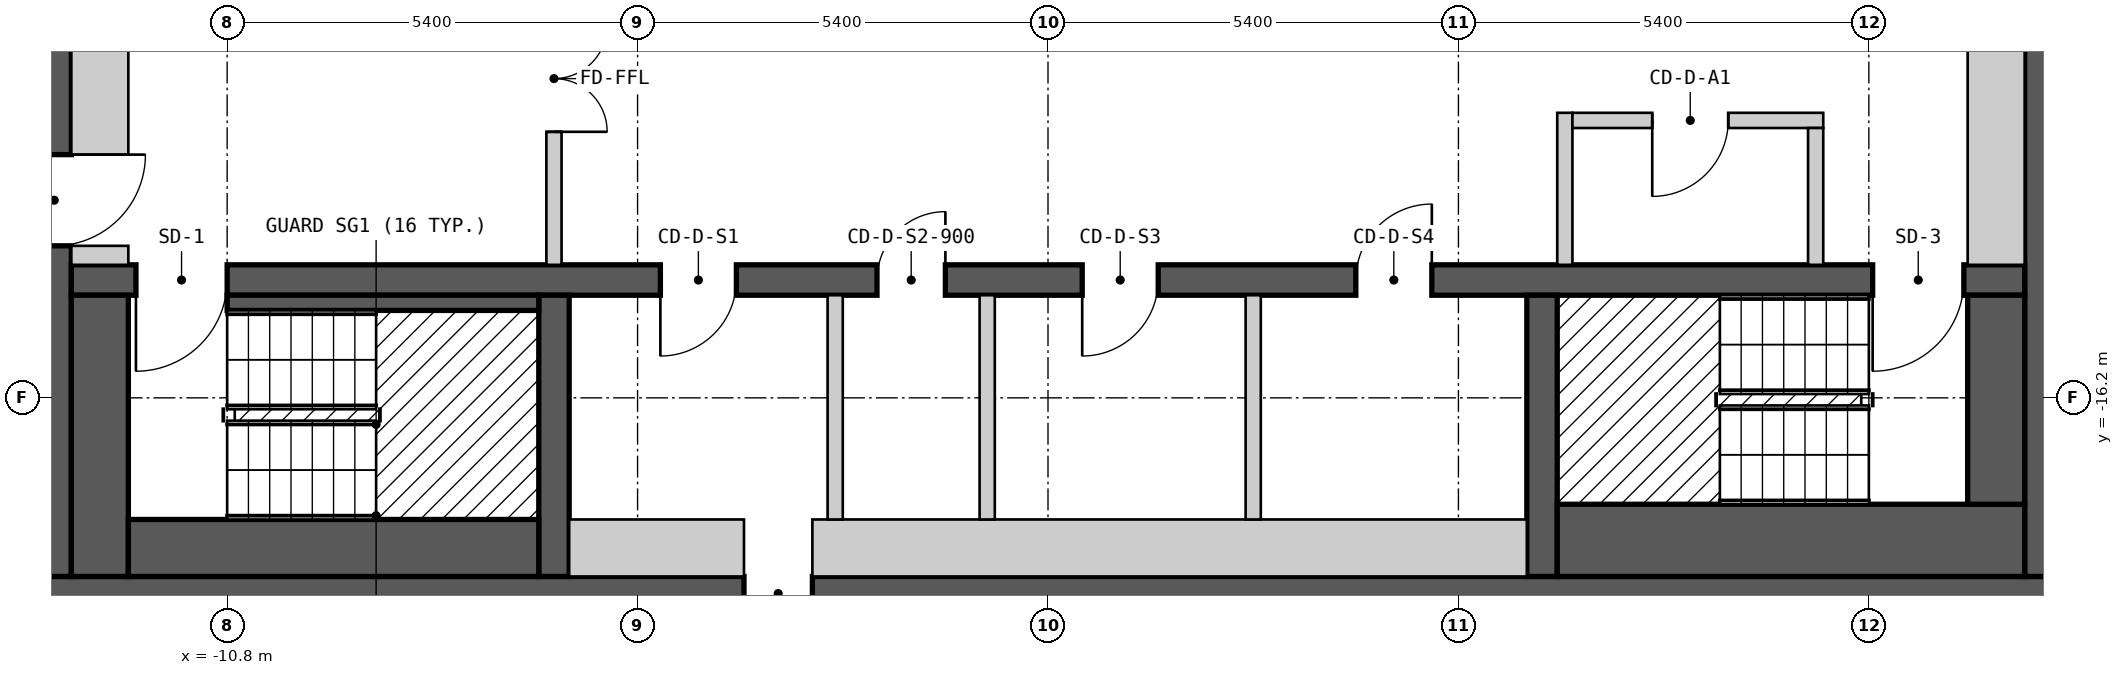
"""IFC4 building model, lengths in metres.
Left out: names, types, materials, properties, quantities, classifications, styles, units other than length and angle.
Written with IfcOpenShell. Run it as: python <this file> out.ifc"""

import sys

from ifc_helpers import new_model, si_unit, direction, frame, frame_2d, origin, place, context, subcontext, project, spatial, polyline, rectangle, outline, extrude, element, fill, save


model = new_model("IFC4")
c1 = context("Model", 3, precision=1e-05, world=origin(), true_north=direction((0.0, 1.0)))
c2 = subcontext(c1, "Body", "Model", "MODEL_VIEW")
j1 = project(units=[si_unit("LENGTHUNIT", "METRE"), si_unit("PLANEANGLEUNIT", "RADIAN")], contexts=[c1])
p1 = place(None, origin())
s1 = spatial("IfcSite", under=j1, at=p1, CompositionType="ELEMENT")
p2 = place(p1, origin())
s2 = spatial("IfcBuilding", under=s1, at=p2, CompositionType="ELEMENT")
p3 = place(p2, frame((0.0, 0.0, 217.8)))
s3 = spatial("IfcBuildingStorey", under=s2, at=p3, CompositionType="ELEMENT", Elevation=217.8)
p4 = place(p3, frame((-13.3, -18.775, 0.0), z_axis=(0.0, 0.0, 1.0), x_axis=(1.0, 0.0, 0.0)))
e1 = element("IfcWall", 1, at=p4, inside=s3, PredefinedType="SHEAR", context=c2, shape_type="SweptSolid", body=[
    extrude(rectangle(XDim=26.6, YDim=0.45, at=frame_2d((13.3, 0.0))), origin(), (0.0, 0.0, 1.0), 2.7),
])
p5 = place(p4, frame((9.3, 0.0, 0.0)))
e2 = element("IfcOpeningElement", 2, at=p5, cuts=e1, PredefinedType="OPENING", context=c2, shape_type="SweptSolid", body=[
    extrude(rectangle(XDim=0.9, YDim=2.1, at=frame_2d((0.45, 1.05))), frame((0.0, 0.235, 0.0), z_axis=(0.0, -1.0, 0.0), x_axis=(1.0, 0.0, 0.0)), (0.0, 0.0, 1.0), 0.47),
])
p6 = place(p3, frame((-13.075, -18.55, 0.0), z_axis=(0.0, 0.0, 1.0), x_axis=(0.0, 1.0, 0.0)))
e3 = element("IfcWall", 3, at=p6, inside=s3, PredefinedType="SHEAR", context=c2, shape_type="SweptSolid", body=[
    extrude(rectangle(XDim=13.1, YDim=0.45, at=frame_2d((6.55, 0.0))), origin(), (0.0, 0.0, 1.0), 2.7),
])
p7 = place(p6, frame((4.35, 0.0, 0.0)))
e4 = element("IfcOpeningElement", 4, at=p7, cuts=e3, PredefinedType="OPENING", context=c2, shape_type="SweptSolid", body=[
    extrude(rectangle(XDim=1.2, YDim=2.1, at=frame_2d((0.6, 1.05))), frame((0.0, 0.235, 0.0), z_axis=(0.0, -1.0, 0.0), x_axis=(1.0, 0.0, 0.0)), (0.0, 0.0, 1.0), 0.47),
])
p8 = place(p3, frame((13.075, -18.55, 0.0), z_axis=(0.0, 0.0, 1.0), x_axis=(0.0, 1.0, 0.0)))
e5 = element("IfcWall", 5, at=p8, inside=s3, PredefinedType="SHEAR", context=c2, shape_type="SweptSolid", body=[
    extrude(rectangle(XDim=13.1, YDim=0.45, at=frame_2d((6.55, 0.0))), origin(), (0.0, 0.0, 1.0), 2.7),
])
p9 = place(p3, frame((-12.85, -14.65, 0.0), z_axis=(0.0, 0.0, 1.0), x_axis=(1.0, 0.0, 0.0)))
e6 = element("IfcWall", 6, at=p9, inside=s3, PredefinedType="SHEAR", context=c2, shape_type="SweptSolid", body=[
    extrude(rectangle(XDim=25.7, YDim=0.4, at=frame_2d((12.85, 0.0))), origin(), (0.0, 0.0, 1.0), 2.7),
])
p10 = place(p9, frame((2.05, 0.0, 0.0), z_axis=(0.0, 0.0, 1.0), x_axis=(-1.0, 0.0, 0.0)))
e7 = element("IfcOpeningElement", 7, at=p10, cuts=e6, PredefinedType="OPENING", context=c2, shape_type="SweptSolid", body=[
    extrude(rectangle(XDim=1.2, YDim=2.1, at=frame_2d((0.6, 1.05))), frame((0.0, 0.21, 0.0), z_axis=(0.0, -1.0, 0.0), x_axis=(1.0, 0.0, 0.0)), (0.0, 0.0, 1.0), 0.42),
])
p11 = place(p9, frame((24.9, 0.0, 0.0), z_axis=(0.0, 0.0, 1.0), x_axis=(-1.0, 0.0, 0.0)))
e8 = element("IfcOpeningElement", 8, at=p11, cuts=e6, PredefinedType="OPENING", context=c2, shape_type="SweptSolid", body=[
    extrude(rectangle(XDim=1.2, YDim=2.1, at=frame_2d((0.6, 1.05))), frame((0.0, 0.21, 0.0), z_axis=(0.0, -1.0, 0.0), x_axis=(1.0, 0.0, 0.0)), (0.0, 0.0, 1.0), 0.42),
])
p12 = place(p9, frame((8.75, 0.0, 0.0), z_axis=(0.0, 0.0, 1.0), x_axis=(-1.0, 0.0, 0.0)))
e9 = element("IfcOpeningElement", 9, at=p12, cuts=e6, PredefinedType="OPENING", context=c2, shape_type="SweptSolid", body=[
    extrude(rectangle(XDim=1.0, YDim=2.1, at=frame_2d((0.5, 1.05))), frame((0.0, 0.21, 0.0), z_axis=(0.0, -1.0, 0.0), x_axis=(1.0, 0.0, 0.0)), (0.0, 0.0, 1.0), 0.42),
])
p13 = place(p9, frame((11.5, 0.0, 0.0), z_axis=(0.0, 0.0, 1.0), x_axis=(-1.0, 0.0, 0.0)))
e10 = element("IfcOpeningElement", 10, at=p13, cuts=e6, PredefinedType="OPENING", context=c2, shape_type="SweptSolid", body=[
    extrude(rectangle(XDim=0.9, YDim=2.1, at=frame_2d((0.45, 1.05))), frame((0.0, 0.21, 0.0), z_axis=(0.0, -1.0, 0.0), x_axis=(1.0, 0.0, 0.0)), (0.0, 0.0, 1.0), 0.42),
])
p14 = place(p9, frame((14.3, 0.0, 0.0), z_axis=(0.0, 0.0, 1.0), x_axis=(-1.0, 0.0, 0.0)))
e11 = element("IfcOpeningElement", 11, at=p14, cuts=e6, PredefinedType="OPENING", context=c2, shape_type="SweptSolid", body=[
    extrude(rectangle(XDim=1.0, YDim=2.1, at=frame_2d((0.5, 1.05))), frame((0.0, 0.21, 0.0), z_axis=(0.0, -1.0, 0.0), x_axis=(1.0, 0.0, 0.0)), (0.0, 0.0, 1.0), 0.42),
])
p15 = place(p9, frame((17.9, 0.0, 0.0), z_axis=(0.0, 0.0, 1.0), x_axis=(-1.0, 0.0, 0.0)))
e12 = element("IfcOpeningElement", 12, at=p15, cuts=e6, PredefinedType="OPENING", context=c2, shape_type="SweptSolid", body=[
    extrude(rectangle(XDim=1.0, YDim=2.1, at=frame_2d((0.5, 1.05))), frame((0.0, 0.21, 0.0), z_axis=(0.0, -1.0, 0.0), x_axis=(1.0, 0.0, 0.0)), (0.0, 0.0, 1.0), 0.42),
])
for number, where, z_axis, x_axis in (
    (13, (-6.5, -18.55, 0.0), (0.0, 0.0, 1.0), (0.0, 1.0, 0.0)),
    (14, (6.5, -18.55, 0.0), (0.0, 0.0, 1.0), (0.0, 1.0, 0.0)),
):
    element("IfcWall", number, at=place(p3, frame(where, z_axis=z_axis, x_axis=x_axis)), inside=s3, PredefinedType="SHEAR", context=c2, shape_type="SweptSolid", body=[
        extrude(rectangle(XDim=3.7, YDim=0.4, at=frame_2d((1.85, 0.0))), origin(), (0.0, 0.0, 1.0), 2.7),
    ])
p16 = place(p3, frame((-15.34, -18.37, 0.0), z_axis=(0.0, 0.0, 1.0), x_axis=(0.866022959057, -0.500004234368, 0.0)))
e15 = element("IfcWall", 15, at=p16, inside=s3, PredefinedType="SOLIDWALL", context=c2, shape_type="SweptSolid", body=[
    extrude(outline(polyline([(0.0, -0.15), (5.0, -0.15), (4.92, 0.15), (0.08, 0.15), (0.0, -0.15)])), origin(), (0.0, 0.0, 1.0), 2.7),
])
p17 = place(p16, frame((0.65, 0.0, 0.15)))
e16 = element("IfcOpeningElement", 16, at=p17, cuts=e15, PredefinedType="OPENING", context=c2, shape_type="SweptSolid", body=[
    extrude(rectangle(XDim=1.2, YDim=2.1, at=frame_2d((0.6, 1.05))), frame((0.0, 0.16, 0.0), z_axis=(0.0, -1.0, 0.0), x_axis=(1.0, 0.0, 0.0)), (0.0, 0.0, 1.0), 0.32),
])
p18 = place(p3, frame((11.01, -20.87, 0.0), z_axis=(0.0, 0.0, 1.0), x_axis=(0.866022959057, 0.500004234368, 0.0)))
e17 = element("IfcWall", 17, at=p18, inside=s3, PredefinedType="SOLIDWALL", context=c2, shape_type="SweptSolid", body=[
    extrude(outline(polyline([(0.0, -0.15), (5.0, -0.15), (4.92, 0.15), (0.08, 0.15), (0.0, -0.15)])), origin(), (0.0, 0.0, 1.0), 2.7),
])
p19 = place(p18, frame((0.65, 0.0, 0.15)))
e18 = element("IfcOpeningElement", 18, at=p19, cuts=e17, PredefinedType="OPENING", context=c2, shape_type="SweptSolid", body=[
    extrude(rectangle(XDim=1.2, YDim=2.1, at=frame_2d((0.6, 1.05))), frame((0.0, 0.16, 0.0), z_axis=(0.0, -1.0, 0.0), x_axis=(1.0, 0.0, 0.0)), (0.0, 0.0, 1.0), 0.32),
])
p20 = place(p3, frame((-12.475, -18.55, 0.0), z_axis=(0.0, 0.0, 1.0), x_axis=(0.0, 1.0, 0.0)))
e19 = element("IfcWall", 19, at=p20, inside=s3, PredefinedType="SOLIDWALL", context=c2, shape_type="SweptSolid", body=[
    extrude(rectangle(XDim=3.7, YDim=0.75, at=frame_2d((1.85, 0.0))), origin(), (0.0, 0.0, 1.0), 2.7),
])
p21 = place(p3, frame((-12.85, -14.325, 0.0), z_axis=(0.0, 0.0, 1.0), x_axis=(1.0, 0.0, 0.0)))
e20 = element("IfcWall", 20, at=p21, inside=s3, PredefinedType="PARTITIONING", context=c2, shape_type="SweptSolid", body=[
    extrude(rectangle(XDim=0.75, YDim=0.25, at=frame_2d((0.375, 0.0))), origin(), (0.0, 0.0, 1.0), 2.7),
])
p22 = place(p3, frame((-12.475, -13.0, 0.0), z_axis=(0.0, 0.0, 1.0), x_axis=(0.0, 1.0, 0.0)))
e21 = element("IfcWall", 21, at=p22, inside=s3, PredefinedType="PARTITIONING", context=c2, shape_type="SweptSolid", body=[
    extrude(rectangle(XDim=3.45, YDim=0.75, at=frame_2d((1.725, 0.0))), origin(), (0.0, 0.0, 1.0), 2.7),
])
p23 = place(p3, frame((-12.1, -18.175, 0.0), z_axis=(0.0, 0.0, 1.0), x_axis=(1.0, 0.0, 0.0)))
e22 = element("IfcWall", 22, at=p23, inside=s3, PredefinedType="SOLIDWALL", context=c2, shape_type="SweptSolid", body=[
    extrude(rectangle(XDim=5.4, YDim=0.75, at=frame_2d((2.7, 0.0))), origin(), (0.0, 0.0, 1.0), 2.7),
])
p24 = place(p3, frame((-10.8, -14.95, 0.0), z_axis=(0.0, 0.0, 1.0), x_axis=(1.0, 0.0, 0.0)))
e23 = element("IfcWall", 23, at=p24, inside=s3, PredefinedType="SOLIDWALL", context=c2, shape_type="SweptSolid", body=[
    extrude(rectangle(XDim=4.1, YDim=0.2, at=frame_2d((2.05, 0.0))), origin(), (0.0, 0.0, 1.0), 2.7),
])
p25 = place(p3, frame((-6.5, -14.45, 0.0), z_axis=(0.0, 0.0, 1.0), x_axis=(0.0, 1.0, 0.0)))
e24 = element("IfcWall", 24, at=p25, inside=s3, PredefinedType="PARTITIONING", context=c2, shape_type="SweptSolid", body=[
    extrude(rectangle(XDim=4.9, YDim=0.2, at=frame_2d((2.45, 0.0))), origin(), (0.0, 0.0, 1.0), 2.7),
])
p26 = place(p25, frame((3.15, 0.0, 0.0), z_axis=(0.0, 0.0, 1.0), x_axis=(-1.0, 0.0, 0.0)))
e25 = element("IfcOpeningElement", 25, at=p26, cuts=e24, PredefinedType="OPENING", context=c2, shape_type="SweptSolid", body=[
    extrude(rectangle(XDim=1.4, YDim=2.1, at=frame_2d((0.7, 1.05))), frame((0.0, 0.11, 0.0), z_axis=(0.0, -1.0, 0.0), x_axis=(1.0, 0.0, 0.0)), (0.0, 0.0, 1.0), 0.22),
])
p27 = place(p3, frame((-6.3, -18.175, 0.0), z_axis=(0.0, 0.0, 1.0), x_axis=(1.0, 0.0, 0.0)))
e26 = element("IfcWall", 26, at=p27, inside=s3, PredefinedType="PARTITIONING", context=c2, shape_type="SweptSolid", body=[
    extrude(rectangle(XDim=2.3, YDim=0.75, at=frame_2d((1.15, 0.0))), origin(), (0.0, 0.0, 1.0), 2.7),
])
p28 = place(p3, frame((-3.1, -18.175, 0.0), z_axis=(0.0, 0.0, 1.0), x_axis=(1.0, 0.0, 0.0)))
e27 = element("IfcWall", 27, at=p28, inside=s3, PredefinedType="PARTITIONING", context=c2, shape_type="SweptSolid", body=[
    extrude(rectangle(XDim=9.4, YDim=0.75, at=frame_2d((4.7, 0.0))), origin(), (0.0, 0.0, 1.0), 2.7),
])
for number, where, z_axis, x_axis in (
    (28, (-2.8, -17.8, 0.0), (0.0, 0.0, 1.0), (0.0, 1.0, 0.0)),
    (29, (-0.8, -17.8, 0.0), (0.0, 0.0, 1.0), (0.0, 1.0, 0.0)),
    (30, (2.7, -17.8, 0.0), (0.0, 0.0, 1.0), (0.0, 1.0, 0.0)),
):
    element("IfcWall", number, at=place(p3, frame(where, z_axis=z_axis, x_axis=x_axis)), inside=s3, PredefinedType="PARTITIONING", context=c2, shape_type="SweptSolid", body=[
        extrude(rectangle(XDim=2.95, YDim=0.2, at=frame_2d((1.475, 0.0))), origin(), (0.0, 0.0, 1.0), 2.7),
    ])
p29 = place(p3, frame((6.7, -18.075, 0.0), z_axis=(0.0, 0.0, 1.0), x_axis=(1.0, 0.0, 0.0)))
e31 = element("IfcWall", 31, at=p29, inside=s3, PredefinedType="SOLIDWALL", context=c2, shape_type="SweptSolid", body=[
    extrude(rectangle(XDim=6.15, YDim=0.95, at=frame_2d((3.075, 0.0))), origin(), (0.0, 0.0, 1.0), 2.7),
])
p30 = place(p3, frame((6.8, -14.45, 0.0), z_axis=(0.0, 0.0, 1.0), x_axis=(0.0, 1.0, 0.0)))
e32 = element("IfcWall", 32, at=p30, inside=s3, PredefinedType="PARTITIONING", context=c2, shape_type="SweptSolid", body=[
    extrude(rectangle(XDim=2.0, YDim=0.2, at=frame_2d((1.0, 0.0))), origin(), (0.0, 0.0, 1.0), 2.7),
])
p31 = place(p3, frame((6.9, -12.55, 0.0), z_axis=(0.0, 0.0, 1.0), x_axis=(1.0, 0.0, 0.0)))
e33 = element("IfcWall", 33, at=p31, inside=s3, PredefinedType="PARTITIONING", context=c2, shape_type="SweptSolid", body=[
    extrude(rectangle(XDim=3.3, YDim=0.2, at=frame_2d((1.65, 0.0))), origin(), (0.0, 0.0, 1.0), 2.7),
])
p32 = place(p31, frame((2.05, 0.0, 0.0), z_axis=(0.0, 0.0, 1.0), x_axis=(-1.0, 0.0, 0.0)))
e34 = element("IfcOpeningElement", 34, at=p32, cuts=e33, PredefinedType="OPENING", context=c2, shape_type="SweptSolid", body=[
    extrude(rectangle(XDim=1.0, YDim=2.1, at=frame_2d((0.5, 1.05))), frame((0.0, 0.11, 0.0), z_axis=(0.0, -1.0, 0.0), x_axis=(1.0, 0.0, 0.0)), (0.0, 0.0, 1.0), 0.22),
])
p33 = place(p3, frame((10.1, -14.45, 0.0), z_axis=(0.0, 0.0, 1.0), x_axis=(0.0, 1.0, 0.0)))
e35 = element("IfcWall", 35, at=p33, inside=s3, PredefinedType="PARTITIONING", context=c2, shape_type="SweptSolid", body=[
    extrude(rectangle(XDim=1.8, YDim=0.2, at=frame_2d((0.9, 0.0))), origin(), (0.0, 0.0, 1.0), 2.7),
])
p34 = place(p3, frame((12.475, -17.6, 0.0), z_axis=(0.0, 0.0, 1.0), x_axis=(0.0, 1.0, 0.0)))
e36 = element("IfcWall", 36, at=p34, inside=s3, PredefinedType="SOLIDWALL", context=c2, shape_type="SweptSolid", body=[
    extrude(rectangle(XDim=2.75, YDim=0.75, at=frame_2d((1.375, 0.0))), origin(), (0.0, 0.0, 1.0), 2.7),
])
p35 = place(p3, frame((12.475, -14.45, 0.0), z_axis=(0.0, 0.0, 1.0), x_axis=(0.0, 1.0, 0.0)))
e37 = element("IfcWall", 37, at=p35, inside=s3, PredefinedType="PARTITIONING", context=c2, shape_type="SweptSolid", body=[
    extrude(rectangle(XDim=8.25, YDim=0.75, at=frame_2d((4.125, 0.0))), origin(), (0.0, 0.0, 1.0), 2.7),
])
p36 = place(p10, origin())
e38 = element("IfcDoor", 38, at=p36, inside=s3, OperationType="SINGLE_SWING_RIGHT", PredefinedType="DOOR", context=c2, shape_type="SweptSolid", body=[
    extrude(rectangle(XDim=1.2, YDim=2.1, at=frame_2d((0.6, 1.05))), frame((0.0, 0.025, 0.0), z_axis=(0.0, -1.0, 0.0), x_axis=(1.0, 0.0, 0.0)), (0.0, 0.0, 1.0), 0.05),
])
fill(e7, e38)
p37 = place(p11, origin())
e39 = element("IfcDoor", 39, at=p37, inside=s3, OperationType="SINGLE_SWING_RIGHT", PredefinedType="DOOR", context=c2, shape_type="SweptSolid", body=[
    extrude(rectangle(XDim=1.2, YDim=2.1, at=frame_2d((0.6, 1.05))), frame((0.0, 0.025, 0.0), z_axis=(0.0, -1.0, 0.0), x_axis=(1.0, 0.0, 0.0)), (0.0, 0.0, 1.0), 0.05),
])
fill(e8, e39)
p38 = place(p7, origin())
e40 = element("IfcDoor", 40, at=p38, inside=s3, OperationType="SINGLE_SWING_RIGHT", PredefinedType="DOOR", context=c2, shape_type="SweptSolid", body=[
    extrude(rectangle(XDim=1.2, YDim=2.1, at=frame_2d((0.6, 1.05))), frame((0.0, 0.025, 0.0), z_axis=(0.0, -1.0, 0.0), x_axis=(1.0, 0.0, 0.0)), (0.0, 0.0, 1.0), 0.05),
])
fill(e4, e40)
p39 = place(p26, origin())
e41 = element("IfcDoor", 41, at=p39, inside=s3, OperationType="DOUBLE_DOOR_SINGLE_SWING", PredefinedType="DOOR", context=c2, shape_type="SweptSolid", body=[
    extrude(rectangle(XDim=1.4, YDim=2.1, at=frame_2d((0.7, 1.05))), frame((0.0, 0.025, 0.0), z_axis=(0.0, -1.0, 0.0), x_axis=(1.0, 0.0, 0.0)), (0.0, 0.0, 1.0), 0.05),
])
fill(e25, e41)
p40 = place(p32, origin())
e42 = element("IfcDoor", 42, at=p40, inside=s3, OperationType="SINGLE_SWING_RIGHT", PredefinedType="DOOR", context=c2, shape_type="SweptSolid", body=[
    extrude(rectangle(XDim=1.0, YDim=2.1, at=frame_2d((0.5, 1.05))), frame((0.0, 0.025, 0.0), z_axis=(0.0, -1.0, 0.0), x_axis=(1.0, 0.0, 0.0)), (0.0, 0.0, 1.0), 0.05),
])
fill(e34, e42)
p41 = place(p12, origin())
e43 = element("IfcDoor", 43, at=p41, inside=s3, OperationType="SINGLE_SWING_RIGHT", PredefinedType="DOOR", context=c2, shape_type="SweptSolid", body=[
    extrude(rectangle(XDim=1.0, YDim=2.1, at=frame_2d((0.5, 1.05))), frame((0.0, 0.025, 0.0), z_axis=(0.0, -1.0, 0.0), x_axis=(1.0, 0.0, 0.0)), (0.0, 0.0, 1.0), 0.05),
])
fill(e9, e43)
p42 = place(p13, origin())
e44 = element("IfcDoor", 44, at=p42, inside=s3, OperationType="SINGLE_SWING_LEFT", PredefinedType="DOOR", context=c2, shape_type="SweptSolid", body=[
    extrude(rectangle(XDim=0.9, YDim=2.1, at=frame_2d((0.45, 1.05))), frame((0.0, 0.025, 0.0), z_axis=(0.0, -1.0, 0.0), x_axis=(1.0, 0.0, 0.0)), (0.0, 0.0, 1.0), 0.05),
])
fill(e10, e44)
p43 = place(p14, origin())
e45 = element("IfcDoor", 45, at=p43, inside=s3, OperationType="SINGLE_SWING_RIGHT", PredefinedType="DOOR", context=c2, shape_type="SweptSolid", body=[
    extrude(rectangle(XDim=1.0, YDim=2.1, at=frame_2d((0.5, 1.05))), frame((0.0, 0.025, 0.0), z_axis=(0.0, -1.0, 0.0), x_axis=(1.0, 0.0, 0.0)), (0.0, 0.0, 1.0), 0.05),
])
fill(e11, e45)
p44 = place(p15, origin())
e46 = element("IfcDoor", 46, at=p44, inside=s3, OperationType="SINGLE_SWING_LEFT", PredefinedType="DOOR", context=c2, shape_type="SweptSolid", body=[
    extrude(rectangle(XDim=1.0, YDim=2.1, at=frame_2d((0.5, 1.05))), frame((0.0, 0.025, 0.0), z_axis=(0.0, -1.0, 0.0), x_axis=(1.0, 0.0, 0.0)), (0.0, 0.0, 1.0), 0.05),
])
fill(e12, e46)
p45 = place(p5, origin())
e47 = element("IfcDoor", 47, at=p45, inside=s3, OperationType="SINGLE_SWING_RIGHT", PredefinedType="DOOR", context=c2, shape_type="SweptSolid", body=[
    extrude(rectangle(XDim=0.9, YDim=2.1, at=frame_2d((0.45, 1.05))), frame((0.0, 0.025, 0.0), z_axis=(0.0, -1.0, 0.0), x_axis=(1.0, 0.0, 0.0)), (0.0, 0.0, 1.0), 0.05),
])
fill(e2, e47)
save(model, sys.argv[1])
